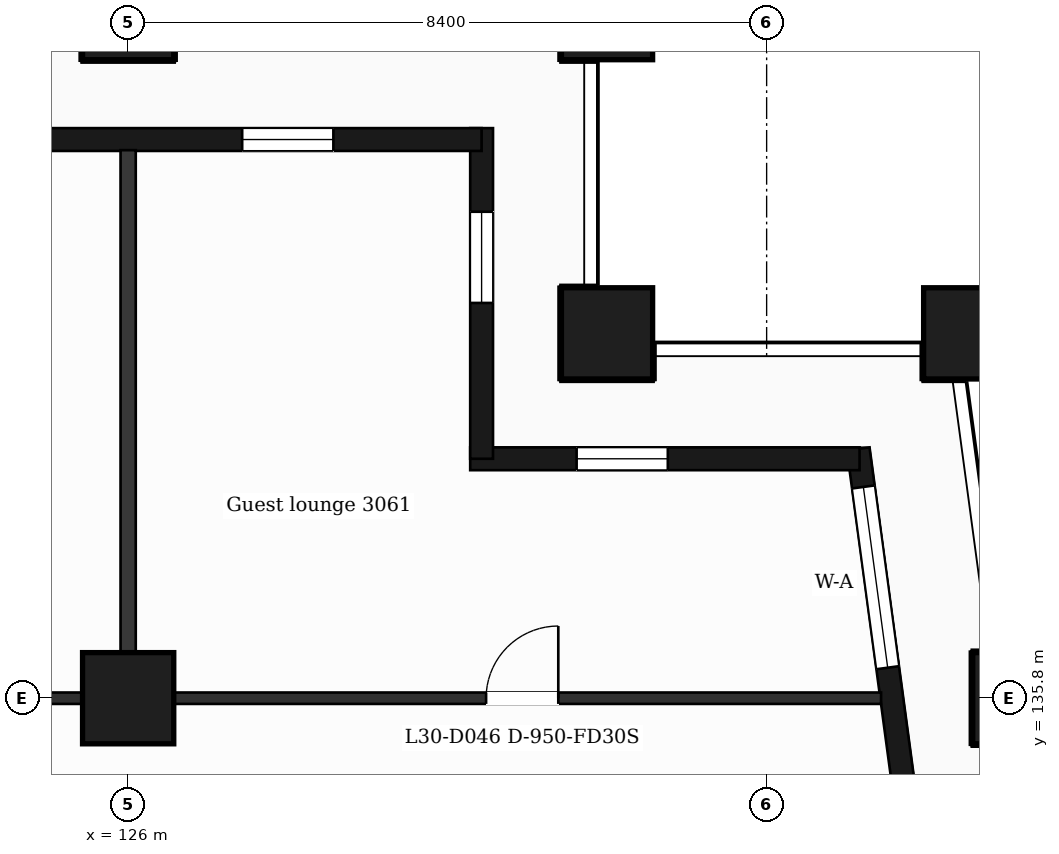
"""IFC4 building model, lengths in metres.
Left out: names, types, materials, properties, quantities, classifications, styles, units other than length and angle.
Written with IfcOpenShell. Run it as: python <this file> out.ifc"""

import sys

from ifc_helpers import new_model, si_unit, direction, frame, frame_2d, origin, origin_2d, place, context, subcontext, project, spatial, rectangle, extrude, element, fill, save


model = new_model("IFC4")
c1 = context("Model", 3, precision=1e-05, world=origin(), true_north=direction((0.0, 1.0)))
c2 = subcontext(c1, "Body", "Model", "MODEL_VIEW")
j1 = project(units=[si_unit("LENGTHUNIT", "METRE"), si_unit("PLANEANGLEUNIT", "RADIAN")], contexts=[c1])
p1 = place(None, origin())
s1 = spatial("IfcSite", under=j1, at=p1, CompositionType="ELEMENT")
p2 = place(p1, origin())
s2 = spatial("IfcBuilding", under=s1, at=p2, CompositionType="ELEMENT")
p3 = place(p2, frame((0.0, 0.0, 128.0)))
s3 = spatial("IfcBuildingStorey", under=s2, at=p3, CompositionType="ELEMENT", Elevation=128.0)
for number, where, z_axis, x_axis in (
    (1, (132.3, 140.6, 0.0), (0.0, 0.0, 1.0), (1.0, 0.0, 0.0)),
    (2, (137.065, 140.6, 0.0), (0.0, 0.0, 1.0), (1.0, 0.0, 0.0)),
    (3, (126.0, 135.8, 0.0), (0.0, 0.0, 1.0), (1.0, 0.0, 0.0)),
    (4, (137.711, 135.8, 0.0), (0.0, 0.0, 1.0), (1.0, 0.0, 0.0)),
    (5, (126.0, 144.8, 0.0), (0.0, 0.0, 1.0), (1.0, 0.0, 0.0)),
    (6, (132.3, 144.8, 0.0), (0.0, 0.0, 1.0), (1.0, 0.0, 0.0)),
):
    element("IfcColumn", number, at=place(p3, frame(where, z_axis=z_axis, x_axis=x_axis)), inside=s3, PredefinedType="COLUMN", context=c2, shape_type="SweptSolid", body=[
        extrude(rectangle(XDim=1.2, YDim=1.2, at=origin_2d()), origin(), (0.0, 0.0, 1.0), 3.7),
    ])
p4 = place(p3, frame((136.504, 132.4, 0.0), z_axis=(0.0, 0.0, 1.0), x_axis=(-0.133399697462, 0.99106231929, 0.0)))
e7 = element("IfcWall", 7, at=p4, inside=s3, PredefinedType="SOLIDWALL", context=c2, shape_type="SweptSolid", body=[
    extrude(rectangle(XDim=6.74, YDim=0.3, at=frame_2d((3.37, 0.0))), origin(), (0.0, 0.0, 1.0), 3.38),
])
p5 = place(p4, frame((1.115, 0.0, 0.0)))
e8 = element("IfcOpeningElement", 8, at=p5, cuts=e7, PredefinedType="OPENING", context=c2, shape_type="SweptSolid", body=[
    extrude(rectangle(XDim=1.2, YDim=2.4, at=frame_2d((0.6, 1.2))), frame((0.0, 0.16, 0.0), z_axis=(0.0, -1.0, 0.0), x_axis=(1.0, 0.0, 0.0)), (0.0, 0.0, 1.0), 0.32),
])
p6 = place(p4, frame((3.835, 0.0, 0.9)))
e9 = element("IfcOpeningElement", 9, at=p6, cuts=e7, PredefinedType="OPENING", context=c2, shape_type="SweptSolid", body=[
    extrude(rectangle(XDim=2.4, YDim=2.1, at=frame_2d((1.2, 1.05))), frame((0.0, 0.16, 0.0), z_axis=(0.0, -1.0, 0.0), x_axis=(1.0, 0.0, 0.0)), (0.0, 0.0, 1.0), 0.32),
])
p7 = place(p3, frame((135.623, 138.95, 0.0), z_axis=(0.0, 0.0, 1.0), x_axis=(-1.0, 0.0, 0.0)))
e10 = element("IfcWall", 10, at=p7, inside=s3, PredefinedType="SOLIDWALL", context=c2, shape_type="SweptSolid", body=[
    extrude(rectangle(XDim=5.123, YDim=0.3, at=frame_2d((2.561, 0.0))), origin(), (0.0, 0.0, 1.0), 3.38),
])
p8 = place(p7, frame((2.523, 0.0, 0.9)))
e11 = element("IfcOpeningElement", 11, at=p8, cuts=e10, PredefinedType="OPENING", context=c2, shape_type="SweptSolid", body=[
    extrude(rectangle(XDim=1.2, YDim=2.1, at=frame_2d((0.6, 1.05))), frame((0.0, 0.16, 0.0), z_axis=(0.0, -1.0, 0.0), x_axis=(1.0, 0.0, 0.0)), (0.0, 0.0, 1.0), 0.32),
])
p9 = place(p3, frame((130.65, 138.95, 0.0), z_axis=(0.0, 0.0, 1.0), x_axis=(0.0, 1.0, 0.0)))
e12 = element("IfcWall", 12, at=p9, inside=s3, PredefinedType="SOLIDWALL", context=c2, shape_type="SweptSolid", body=[
    extrude(rectangle(XDim=4.35, YDim=0.3, at=frame_2d((2.175, 0.0))), origin(), (0.0, 0.0, 1.0), 3.38),
])
p10 = place(p9, frame((2.05, 0.0, 0.9)))
e13 = element("IfcOpeningElement", 13, at=p10, cuts=e12, PredefinedType="OPENING", context=c2, shape_type="SweptSolid", body=[
    extrude(rectangle(XDim=1.2, YDim=2.1, at=frame_2d((0.6, 1.05))), frame((0.0, 0.16, 0.0), z_axis=(0.0, -1.0, 0.0), x_axis=(1.0, 0.0, 0.0)), (0.0, 0.0, 1.0), 0.32),
])
p11 = place(p3, frame((130.65, 143.15, 0.0), z_axis=(0.0, 0.0, 1.0), x_axis=(-1.0, 0.0, 0.0)))
e14 = element("IfcWall", 14, at=p11, inside=s3, PredefinedType="SOLIDWALL", context=c2, shape_type="SweptSolid", body=[
    extrude(rectangle(XDim=16.35, YDim=0.3, at=frame_2d((8.175, 0.0))), origin(), (0.0, 0.0, 1.0), 3.38),
])
p12 = place(p11, frame((1.95, 0.0, 0.9)))
e15 = element("IfcOpeningElement", 15, at=p12, cuts=e14, PredefinedType="OPENING", context=c2, shape_type="SweptSolid", body=[
    extrude(rectangle(XDim=1.2, YDim=2.1, at=frame_2d((0.6, 1.05))), frame((0.0, 0.16, 0.0), z_axis=(0.0, -1.0, 0.0), x_axis=(1.0, 0.0, 0.0)), (0.0, 0.0, 1.0), 0.32),
])
p13 = place(p11, frame((6.15, 0.0, 0.0)))
e16 = element("IfcOpeningElement", 16, at=p13, cuts=e14, PredefinedType="OPENING", context=c2, shape_type="SweptSolid", body=[
    extrude(rectangle(XDim=1.2, YDim=2.4, at=frame_2d((0.6, 1.2))), frame((0.0, 0.16, 0.0), z_axis=(0.0, -1.0, 0.0), x_axis=(1.0, 0.0, 0.0)), (0.0, 0.0, 1.0), 0.32),
])
p14 = place(p11, frame((9.75, 0.0, 0.9)))
e17 = element("IfcOpeningElement", 17, at=p14, cuts=e14, PredefinedType="OPENING", context=c2, shape_type="SweptSolid", body=[
    extrude(rectangle(XDim=2.4, YDim=2.1, at=frame_2d((1.2, 1.05))), frame((0.0, 0.16, 0.0), z_axis=(0.0, -1.0, 0.0), x_axis=(1.0, 0.0, 0.0)), (0.0, 0.0, 1.0), 0.32),
])
p15 = place(p11, frame((13.45, 0.0, 0.9)))
e18 = element("IfcOpeningElement", 18, at=p15, cuts=e14, PredefinedType="OPENING", context=c2, shape_type="SweptSolid", body=[
    extrude(rectangle(XDim=2.4, YDim=2.1, at=frame_2d((1.2, 1.05))), frame((0.0, 0.16, 0.0), z_axis=(0.0, -1.0, 0.0), x_axis=(1.0, 0.0, 0.0)), (0.0, 0.0, 1.0), 0.32),
])
p16 = place(p3, frame((90.895, 135.8, 0.0), z_axis=(0.0, 0.0, 1.0), x_axis=(1.0, 0.0, 0.0)))
e19 = element("IfcWall", 19, at=p16, inside=s3, PredefinedType="PARTITIONING", context=c2, shape_type="SweptSolid", body=[
    extrude(rectangle(XDim=45.011, YDim=0.15, at=frame_2d((22.505, 0.0))), origin(), (0.0, 0.0, 1.0), 3.38),
])
p17 = place(p16, frame((8.005, 0.0, 0.0)))
e20 = element("IfcOpeningElement", 20, at=p17, cuts=e19, PredefinedType="OPENING", context=c2, shape_type="SweptSolid", body=[
    extrude(rectangle(XDim=1.0, YDim=2.1, at=frame_2d((0.5, 1.05))), frame((0.0, 0.085, 0.0), z_axis=(0.0, -1.0, 0.0), x_axis=(1.0, 0.0, 0.0)), (0.0, 0.0, 1.0), 0.17),
])
p18 = place(p16, frame((10.625, 0.0, 0.0)))
e21 = element("IfcOpeningElement", 21, at=p18, cuts=e19, PredefinedType="OPENING", context=c2, shape_type="SweptSolid", body=[
    extrude(rectangle(XDim=0.95, YDim=2.1, at=frame_2d((0.475, 1.05))), frame((0.0, 0.085, 0.0), z_axis=(0.0, -1.0, 0.0), x_axis=(1.0, 0.0, 0.0)), (0.0, 0.0, 1.0), 0.17),
])
p19 = place(p16, frame((14.38, 0.0, 0.0)))
e22 = element("IfcOpeningElement", 22, at=p19, cuts=e19, PredefinedType="OPENING", context=c2, shape_type="SweptSolid", body=[
    extrude(rectangle(XDim=0.95, YDim=2.1, at=frame_2d((0.475, 1.05))), frame((0.0, 0.085, 0.0), z_axis=(0.0, -1.0, 0.0), x_axis=(1.0, 0.0, 0.0)), (0.0, 0.0, 1.0), 0.17),
])
p20 = place(p16, frame((21.265, 0.0, 0.0)))
e23 = element("IfcOpeningElement", 23, at=p20, cuts=e19, PredefinedType="OPENING", context=c2, shape_type="SweptSolid", body=[
    extrude(rectangle(XDim=0.95, YDim=2.1, at=frame_2d((0.475, 1.05))), frame((0.0, 0.085, 0.0), z_axis=(0.0, -1.0, 0.0), x_axis=(1.0, 0.0, 0.0)), (0.0, 0.0, 1.0), 0.17),
])
p21 = place(p16, frame((30.835, 0.0, 0.0)))
e24 = element("IfcOpeningElement", 24, at=p21, cuts=e19, PredefinedType="OPENING", context=c2, shape_type="SweptSolid", body=[
    extrude(rectangle(XDim=0.95, YDim=2.1, at=frame_2d((0.475, 1.05))), frame((0.0, 0.085, 0.0), z_axis=(0.0, -1.0, 0.0), x_axis=(1.0, 0.0, 0.0)), (0.0, 0.0, 1.0), 0.17),
])
p22 = place(p16, frame((39.814, 0.0, 0.0)))
e25 = element("IfcOpeningElement", 25, at=p22, cuts=e19, PredefinedType="OPENING", context=c2, shape_type="SweptSolid", body=[
    extrude(rectangle(XDim=0.95, YDim=2.1, at=frame_2d((0.475, 1.05))), frame((0.0, 0.085, 0.0), z_axis=(0.0, -1.0, 0.0), x_axis=(1.0, 0.0, 0.0)), (0.0, 0.0, 1.0), 0.17),
])
p23 = place(p3, frame((126.0, 135.875, 0.0), z_axis=(0.0, 0.0, 1.0), x_axis=(0.0, 1.0, 0.0)))
e26 = element("IfcWall", 26, at=p23, inside=s3, PredefinedType="PARTITIONING", context=c2, shape_type="SweptSolid", body=[
    extrude(rectangle(XDim=7.135, YDim=0.2, at=frame_2d((3.567, 0.0))), origin(), (0.0, 0.0, 1.0), 3.38),
])
p24 = place(p6, origin())
e27 = element("IfcWindow", 27, at=p24, inside=s3, PartitioningType="SINGLE_PANEL", PredefinedType="WINDOW", context=c2, shape_type="SweptSolid", body=[
    extrude(rectangle(XDim=2.4, YDim=2.1, at=frame_2d((1.2, 1.05))), frame((0.0, 0.03, 0.0), z_axis=(0.0, -1.0, 0.0), x_axis=(1.0, 0.0, 0.0)), (0.0, 0.0, 1.0), 0.06),
])
fill(e9, e27)
p25 = place(p8, origin())
e28 = element("IfcWindow", 28, at=p25, inside=s3, PartitioningType="SINGLE_PANEL", PredefinedType="WINDOW", context=c2, shape_type="SweptSolid", body=[
    extrude(rectangle(XDim=1.2, YDim=2.1, at=frame_2d((0.6, 1.05))), frame((0.0, 0.03, 0.0), z_axis=(0.0, -1.0, 0.0), x_axis=(1.0, 0.0, 0.0)), (0.0, 0.0, 1.0), 0.06),
])
fill(e11, e28)
p26 = place(p10, origin())
e29 = element("IfcWindow", 29, at=p26, inside=s3, PartitioningType="SINGLE_PANEL", PredefinedType="WINDOW", context=c2, shape_type="SweptSolid", body=[
    extrude(rectangle(XDim=1.2, YDim=2.1, at=frame_2d((0.6, 1.05))), frame((0.0, 0.03, 0.0), z_axis=(0.0, -1.0, 0.0), x_axis=(1.0, 0.0, 0.0)), (0.0, 0.0, 1.0), 0.06),
])
fill(e13, e29)
p27 = place(p12, origin())
e30 = element("IfcWindow", 30, at=p27, inside=s3, PartitioningType="SINGLE_PANEL", PredefinedType="WINDOW", context=c2, shape_type="SweptSolid", body=[
    extrude(rectangle(XDim=1.2, YDim=2.1, at=frame_2d((0.6, 1.05))), frame((0.0, 0.03, 0.0), z_axis=(0.0, -1.0, 0.0), x_axis=(1.0, 0.0, 0.0)), (0.0, 0.0, 1.0), 0.06),
])
fill(e15, e30)
p28 = place(p22, origin())
e31 = element("IfcDoor", 31, at=p28, inside=s3, OperationType="SINGLE_SWING_RIGHT", PredefinedType="DOOR", context=c2, shape_type="SweptSolid", body=[
    extrude(rectangle(XDim=0.95, YDim=2.1, at=frame_2d((0.475, 1.05))), frame((0.0, 0.025, 0.0), z_axis=(0.0, -1.0, 0.0), x_axis=(1.0, 0.0, 0.0)), (0.0, 0.0, 1.0), 0.05),
])
fill(e25, e31)
save(model, sys.argv[1])
